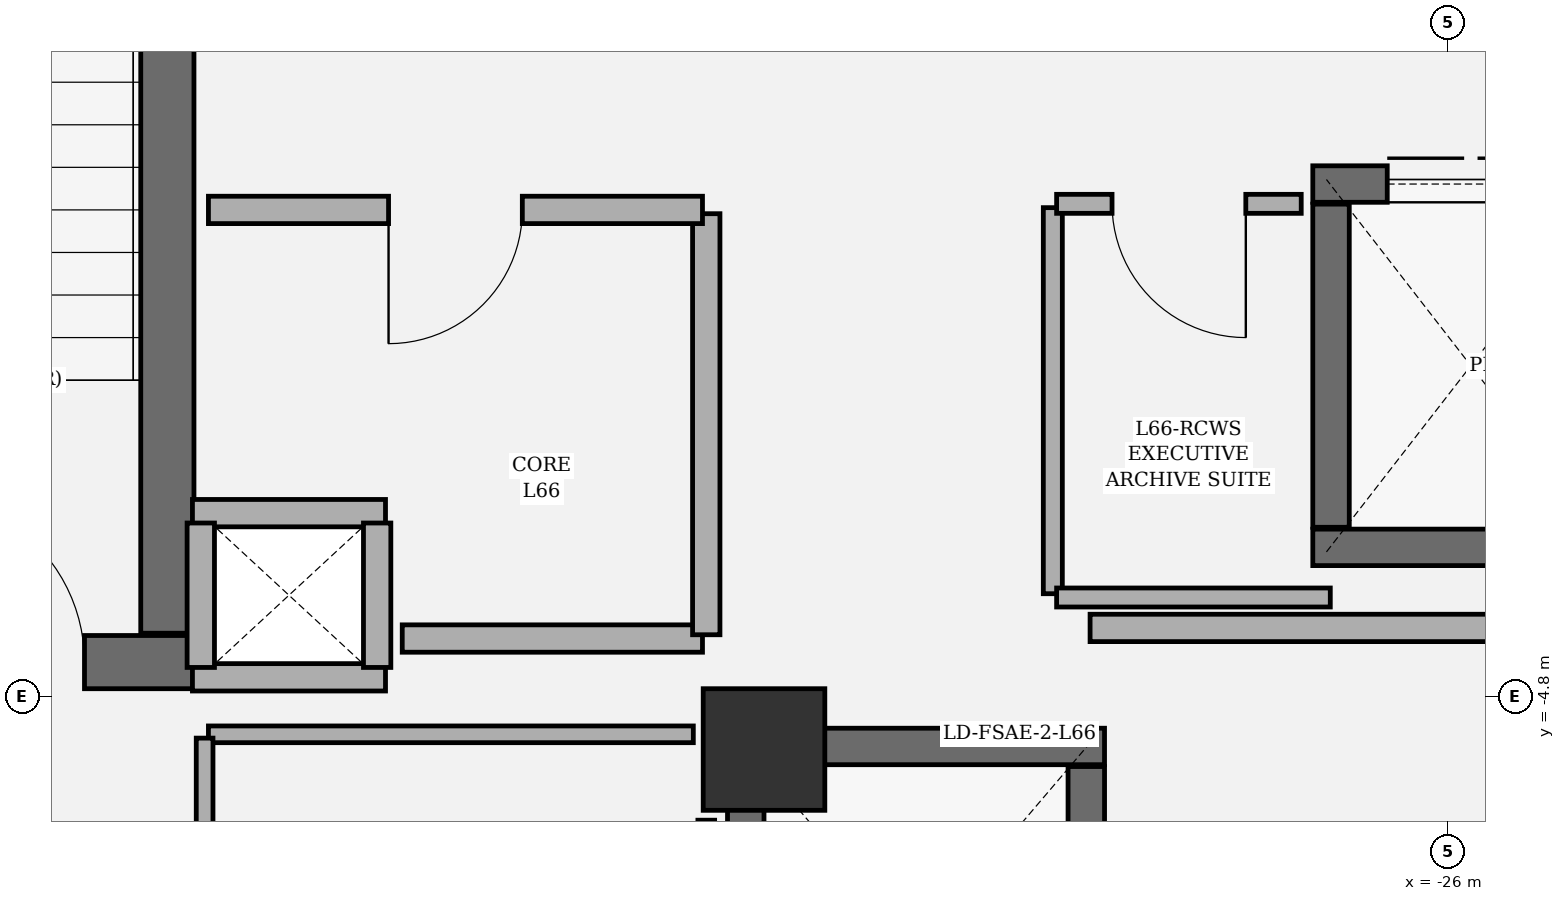
"""IFC4 building model, lengths in metres.
Left out: names, types, materials, properties, quantities, classifications, styles, units other than length and angle.
Written with IfcOpenShell. Run it as: python <this file> out.ifc"""

import sys

from ifc_helpers import new_model, si_unit, direction, frame, frame_2d, origin, origin_2d, place, context, subcontext, project, spatial, rectangle, extrude, element, fill, save


model = new_model("IFC4")
c1 = context("Model", 3, precision=1e-05, world=origin(), true_north=direction((0.0, 1.0)))
c2 = subcontext(c1, "Body", "Model", "MODEL_VIEW")
j1 = project(units=[si_unit("LENGTHUNIT", "METRE"), si_unit("PLANEANGLEUNIT", "RADIAN")], contexts=[c1])
p1 = place(None, origin())
s1 = spatial("IfcSite", under=j1, at=p1, CompositionType="ELEMENT")
p2 = place(p1, origin())
s2 = spatial("IfcBuilding", under=s1, at=p2, CompositionType="ELEMENT")
p3 = place(p2, frame((0.0, 0.0, 285.0)))
s3 = spatial("IfcBuildingStorey", under=s2, at=p3, CompositionType="ELEMENT", Elevation=285.0)
p4 = place(p3, frame((-30.5, -5.15, 0.0), z_axis=(0.0, 0.0, 1.0), x_axis=(1.0, 0.0, 0.0)))
e1 = element("IfcColumn", 1, at=p4, inside=s3, PredefinedType="COLUMN", context=c2, shape_type="SweptSolid", body=[
    extrude(rectangle(XDim=0.8, YDim=0.8, at=origin_2d()), origin(), (0.0, 0.0, 1.0), 4.2),
])
p5 = place(p3, frame((-38.46, -4.575, 0.0), z_axis=(0.0, 0.0, 1.0), x_axis=(1.0, 0.0, 0.0)))
e2 = element("IfcWall", 2, at=p5, inside=s3, PredefinedType="SHEAR", context=c2, shape_type="SweptSolid", body=[
    extrude(rectangle(XDim=4.21, YDim=0.35, at=frame_2d((2.105, 0.0))), origin(), (0.0, 0.0, 1.0), 3.91),
])
p6 = place(p5, frame((2.39, 0.0, 0.0)))
e3 = element("IfcOpeningElement", 3, at=p6, cuts=e2, PredefinedType="OPENING", context=c2, shape_type="SweptSolid", body=[
    extrude(rectangle(XDim=1.1, YDim=2.2, at=frame_2d((0.55, 1.1))), frame((0.0, 0.185, 0.0), z_axis=(0.0, -1.0, 0.0), x_axis=(1.0, 0.0, 0.0)), (0.0, 0.0, 1.0), 0.37),
])
p7 = place(p3, frame((-34.425, -4.385, 0.0), z_axis=(0.0, 0.0, 1.0), x_axis=(0.0, 1.0, 0.0)))
e4 = element("IfcWall", 4, at=p7, inside=s3, PredefinedType="SHEAR", context=c2, shape_type="SweptSolid", body=[
    extrude(rectangle(XDim=8.77, YDim=0.35, at=frame_2d((4.385, 0.0))), origin(), (0.0, 0.0, 1.0), 3.91),
])
p8 = place(p3, frame((-30.74, -5.13, 0.0), z_axis=(0.0, 0.0, 1.0), x_axis=(1.0, 0.0, 0.0)))
e5 = element("IfcWall", 5, at=p8, inside=s3, PredefinedType="SHEAR", context=c2, shape_type="SweptSolid", body=[
    extrude(rectangle(XDim=2.48, YDim=0.24, at=frame_2d((1.24, 0.0))), origin(), (0.0, 0.0, 1.0), 3.91),
])
p9 = place(p3, frame((-30.62, -7.638, 0.0), z_axis=(0.0, 0.0, 1.0), x_axis=(0.0, 1.0, 0.0)))
e6 = element("IfcWall", 6, at=p9, inside=s3, PredefinedType="SHEAR", context=c2, shape_type="SweptSolid", body=[
    extrude(rectangle(XDim=2.376, YDim=0.24, at=frame_2d((1.188, 0.0))), origin(), (0.0, 0.0, 1.0), 3.91),
])
p10 = place(p3, frame((-28.38, -5.262, 0.0), z_axis=(0.0, 0.0, 1.0), x_axis=(0.0, -1.0, 0.0)))
e7 = element("IfcWall", 7, at=p10, inside=s3, PredefinedType="SHEAR", context=c2, shape_type="SweptSolid", body=[
    extrude(rectangle(XDim=2.376, YDim=0.24, at=frame_2d((1.188, 0.0))), origin(), (0.0, 0.0, 1.0), 3.91),
])
p11 = place(p10, frame((0.538, 0.0, 0.0)))
e8 = element("IfcOpeningElement", 8, at=p11, cuts=e7, PredefinedType="OPENING", context=c2, shape_type="SweptSolid", body=[
    extrude(rectangle(XDim=1.3, YDim=2.3, at=frame_2d((0.65, 1.15))), frame((0.0, 0.13, 0.0), z_axis=(0.0, -1.0, 0.0), x_axis=(1.0, 0.0, 0.0)), (0.0, 0.0, 1.0), 0.26),
])
p12 = place(p3, frame((-24.81, -3.82, 0.0), z_axis=(0.0, 0.0, 1.0), x_axis=(-1.0, 0.0, 0.0)))
e9 = element("IfcWall", 9, at=p12, inside=s3, PredefinedType="SHEAR", context=c2, shape_type="SweptSolid", body=[
    extrude(rectangle(XDim=2.08, YDim=0.24, at=frame_2d((1.04, 0.0))), origin(), (0.0, 0.0, 1.0), 3.91),
])
p13 = place(p3, frame((-26.89, -1.43, 0.0), z_axis=(0.0, 0.0, 1.0), x_axis=(1.0, 0.0, 0.0)))
e10 = element("IfcWall", 10, at=p13, inside=s3, PredefinedType="SHEAR", context=c2, shape_type="SweptSolid", body=[
    extrude(rectangle(XDim=2.08, YDim=0.24, at=frame_2d((1.04, 0.0))), origin(), (0.0, 0.0, 1.0), 3.91),
])
p14 = place(p13, frame((0.49, 0.0, 0.0)))
e11 = element("IfcOpeningElement", 11, at=p14, cuts=e10, PredefinedType="OPENING", context=c2, shape_type="SweptSolid", body=[
    extrude(rectangle(XDim=1.1, YDim=2.2, at=frame_2d((0.55, 1.1))), frame((0.0, 0.13, 0.0), z_axis=(0.0, -1.0, 0.0), x_axis=(1.0, 0.0, 0.0)), (0.0, 0.0, 1.0), 0.26),
])
p15 = place(p3, frame((-26.77, -3.688, 0.0), z_axis=(0.0, 0.0, 1.0), x_axis=(0.0, 1.0, 0.0)))
e12 = element("IfcWall", 12, at=p15, inside=s3, PredefinedType="SHEAR", context=c2, shape_type="SweptSolid", body=[
    extrude(rectangle(XDim=2.126, YDim=0.24, at=frame_2d((1.063, 0.0))), origin(), (0.0, 0.0, 1.0), 3.91),
])
for number, where, z_axis, x_axis in (
    (13, (-32.99, -4.675, 0.0), (0.0, 0.0, 1.0), (-1.0, 0.0, 0.0)),
    (14, (-34.26, -3.595, 0.0), (0.0, 0.0, 1.0), (1.0, 0.0, 0.0)),
):
    element("IfcWall", number, at=place(p3, frame(where, z_axis=z_axis, x_axis=x_axis)), inside=s3, PredefinedType="PARTITIONING", context=c2, shape_type="SweptSolid", body=[
        extrude(rectangle(XDim=1.27, YDim=0.18, at=frame_2d((0.635, 0.0))), origin(), (0.0, 0.0, 1.0), 3.91),
    ])
for number, where, z_axis, x_axis in (
    (15, (-34.205, -4.61, 0.0), (0.0, 0.0, 1.0), (0.0, 1.0, 0.0)),
    (16, (-33.045, -3.66, 0.0), (0.0, 0.0, 1.0), (0.0, -1.0, 0.0)),
):
    element("IfcWall", number, at=place(p3, frame(where, z_axis=z_axis, x_axis=x_axis)), inside=s3, PredefinedType="PARTITIONING", context=c2, shape_type="SweptSolid", body=[
        extrude(rectangle(XDim=0.95, YDim=0.18, at=frame_2d((0.475, 0.0))), origin(), (0.0, 0.0, 1.0), 3.91),
    ])
p16 = place(p3, frame((-24.733, -4.35, 0.0), z_axis=(0.0, 0.0, 1.0), x_axis=(-1.0, 0.0, 0.0)))
e17 = element("IfcWall", 17, at=p16, inside=s3, PredefinedType="PARTITIONING", context=c2, shape_type="SweptSolid", body=[
    extrude(rectangle(XDim=3.622, YDim=0.18, at=frame_2d((1.811, 0.0))), origin(), (0.0, 0.0, 1.0), 3.91),
])
p17 = place(p3, frame((-30.88, -7.743, 0.0), z_axis=(0.0, 0.0, 1.0), x_axis=(0.0, 1.0, 0.0)))
e18 = element("IfcWall", 18, at=p17, inside=s3, PredefinedType="PARTITIONING", context=c2, shape_type="SweptSolid", body=[
    extrude(rectangle(XDim=2.128, YDim=0.11, at=frame_2d((1.064, 0.0))), origin(), (0.0, 0.0, 1.0), 3.91),
])
p18 = place(p3, frame((-30.965, -5.05, 0.0), z_axis=(0.0, 0.0, 1.0), x_axis=(-1.0, 0.0, 0.0)))
e19 = element("IfcWall", 19, at=p18, inside=s3, PredefinedType="PARTITIONING", context=c2, shape_type="SweptSolid", body=[
    extrude(rectangle(XDim=3.19, YDim=0.11, at=frame_2d((1.595, 0.0))), origin(), (0.0, 0.0, 1.0), 3.91),
])
p19 = place(p3, frame((-34.18, -5.075, 0.0), z_axis=(0.0, 0.0, 1.0), x_axis=(0.0, -1.0, 0.0)))
e20 = element("IfcWall", 20, at=p19, inside=s3, PredefinedType="PARTITIONING", context=c2, shape_type="SweptSolid", body=[
    extrude(rectangle(XDim=3.25, YDim=0.11, at=frame_2d((1.625, 0.0))), origin(), (0.0, 0.0, 1.0), 3.91),
])
p20 = place(p19, frame((1.185, 0.0, 0.0)))
e21 = element("IfcOpeningElement", 21, at=p20, cuts=e20, PredefinedType="OPENING", context=c2, shape_type="SweptSolid", body=[
    extrude(rectangle(XDim=0.88, YDim=2.1, at=frame_2d((0.44, 1.05))), frame((0.0, 0.065, 0.0), z_axis=(0.0, -1.0, 0.0), x_axis=(1.0, 0.0, 0.0)), (0.0, 0.0, 1.0), 0.13),
])
p21 = place(p3, frame((-28.6, -1.585, 0.0), z_axis=(0.0, 0.0, 1.0), x_axis=(0.0, -1.0, 0.0)))
e22 = element("IfcWall", 22, at=p21, inside=s3, PredefinedType="PARTITIONING", context=c2, shape_type="SweptSolid", body=[
    extrude(rectangle(XDim=2.54, YDim=0.125, at=frame_2d((1.27, 0.0))), origin(), (0.0, 0.0, 1.0), 3.91),
])
p22 = place(p3, frame((-28.575, -4.15, 0.0), z_axis=(0.0, 0.0, 1.0), x_axis=(1.0, 0.0, 0.0)))
e23 = element("IfcWall", 23, at=p22, inside=s3, PredefinedType="PARTITIONING", context=c2, shape_type="SweptSolid", body=[
    extrude(rectangle(XDim=1.8, YDim=0.125, at=frame_2d((0.9, 0.0))), origin(), (0.0, 0.0, 1.0), 3.91),
])
p23 = place(p3, frame((-26.966, -1.56, 0.0), z_axis=(0.0, 0.0, 1.0), x_axis=(-1.0, 0.0, 0.0)))
e24 = element("IfcWall", 24, at=p23, inside=s3, PredefinedType="PARTITIONING", context=c2, shape_type="SweptSolid", body=[
    extrude(rectangle(XDim=1.609, YDim=0.125, at=frame_2d((0.805, 0.0))), origin(), (0.0, 0.0, 1.0), 3.91),
])
p24 = place(p23, frame((0.365, 0.0, 0.0)))
e25 = element("IfcOpeningElement", 25, at=p24, cuts=e24, PredefinedType="OPENING", context=c2, shape_type="SweptSolid", body=[
    extrude(rectangle(XDim=0.88, YDim=2.1, at=frame_2d((0.44, 1.05))), frame((0.0, 0.073, 0.0), z_axis=(0.0, -1.0, 0.0), x_axis=(1.0, 0.0, 0.0)), (0.0, 0.0, 1.0), 0.145),
])
p25 = place(p3, frame((-32.88, -4.42, 0.0), z_axis=(0.0, 0.0, 1.0), x_axis=(1.0, 0.0, 0.0)))
e26 = element("IfcWall", 26, at=p25, inside=s3, PredefinedType="PARTITIONING", context=c2, shape_type="SweptSolid", body=[
    extrude(rectangle(XDim=1.975, YDim=0.18, at=frame_2d((0.988, 0.0))), origin(), (0.0, 0.0, 1.0), 3.91),
])
p26 = place(p3, frame((-30.88, -4.395, 0.0), z_axis=(0.0, 0.0, 1.0), x_axis=(0.0, 1.0, 0.0)))
e27 = element("IfcWall", 27, at=p26, inside=s3, PredefinedType="PARTITIONING", context=c2, shape_type="SweptSolid", body=[
    extrude(rectangle(XDim=2.77, YDim=0.18, at=frame_2d((1.385, 0.0))), origin(), (0.0, 0.0, 1.0), 3.91),
])
p27 = place(p3, frame((-30.905, -1.6, 0.0), z_axis=(0.0, 0.0, 1.0), x_axis=(-1.0, 0.0, 0.0)))
e28 = element("IfcWall", 28, at=p27, inside=s3, PredefinedType="PARTITIONING", context=c2, shape_type="SweptSolid", body=[
    extrude(rectangle(XDim=3.25, YDim=0.18, at=frame_2d((1.625, 0.0))), origin(), (0.0, 0.0, 1.0), 3.91),
])
p28 = place(p27, frame((1.185, 0.0, 0.0)))
e29 = element("IfcOpeningElement", 29, at=p28, cuts=e28, PredefinedType="OPENING", context=c2, shape_type="SweptSolid", body=[
    extrude(rectangle(XDim=0.88, YDim=2.1, at=frame_2d((0.44, 1.05))), frame((0.0, 0.1, 0.0), z_axis=(0.0, -1.0, 0.0), x_axis=(1.0, 0.0, 0.0)), (0.0, 0.0, 1.0), 0.2),
])
p29 = place(p6, origin())
e30 = element("IfcDoor", 30, at=p29, inside=s3, OperationType="SINGLE_SWING_LEFT", PredefinedType="DOOR", context=c2, shape_type="SweptSolid", body=[
    extrude(rectangle(XDim=1.1, YDim=2.2, at=frame_2d((0.55, 1.1))), frame((0.0, 0.025, 0.0), z_axis=(0.0, -1.0, 0.0), x_axis=(1.0, 0.0, 0.0)), (0.0, 0.0, 1.0), 0.05),
])
fill(e3, e30)
p30 = place(p14, origin())
e31 = element("IfcDoor", 31, at=p30, inside=s3, OperationType="DOUBLE_DOOR_SLIDING", PredefinedType="DOOR", context=c2, shape_type="SweptSolid", body=[
    extrude(rectangle(XDim=1.1, YDim=2.2, at=frame_2d((0.55, 1.1))), frame((0.0, 0.025, 0.0), z_axis=(0.0, -1.0, 0.0), x_axis=(1.0, 0.0, 0.0)), (0.0, 0.0, 1.0), 0.05),
])
fill(e11, e31)
p31 = place(p24, origin())
e32 = element("IfcDoor", 32, at=p31, inside=s3, OperationType="SINGLE_SWING_LEFT", PredefinedType="DOOR", context=c2, shape_type="SweptSolid", body=[
    extrude(rectangle(XDim=0.88, YDim=2.1, at=frame_2d((0.44, 1.05))), frame((0.0, 0.025, 0.0), z_axis=(0.0, -1.0, 0.0), x_axis=(1.0, 0.0, 0.0)), (0.0, 0.0, 1.0), 0.05),
])
fill(e25, e32)
p32 = place(p28, origin())
e33 = element("IfcDoor", 33, at=p32, inside=s3, OperationType="SINGLE_SWING_RIGHT", PredefinedType="DOOR", context=c2, shape_type="SweptSolid", body=[
    extrude(rectangle(XDim=0.88, YDim=2.1, at=frame_2d((0.44, 1.05))), frame((0.0, 0.025, 0.0), z_axis=(0.0, -1.0, 0.0), x_axis=(1.0, 0.0, 0.0)), (0.0, 0.0, 1.0), 0.05),
])
fill(e29, e33)
save(model, sys.argv[1])
